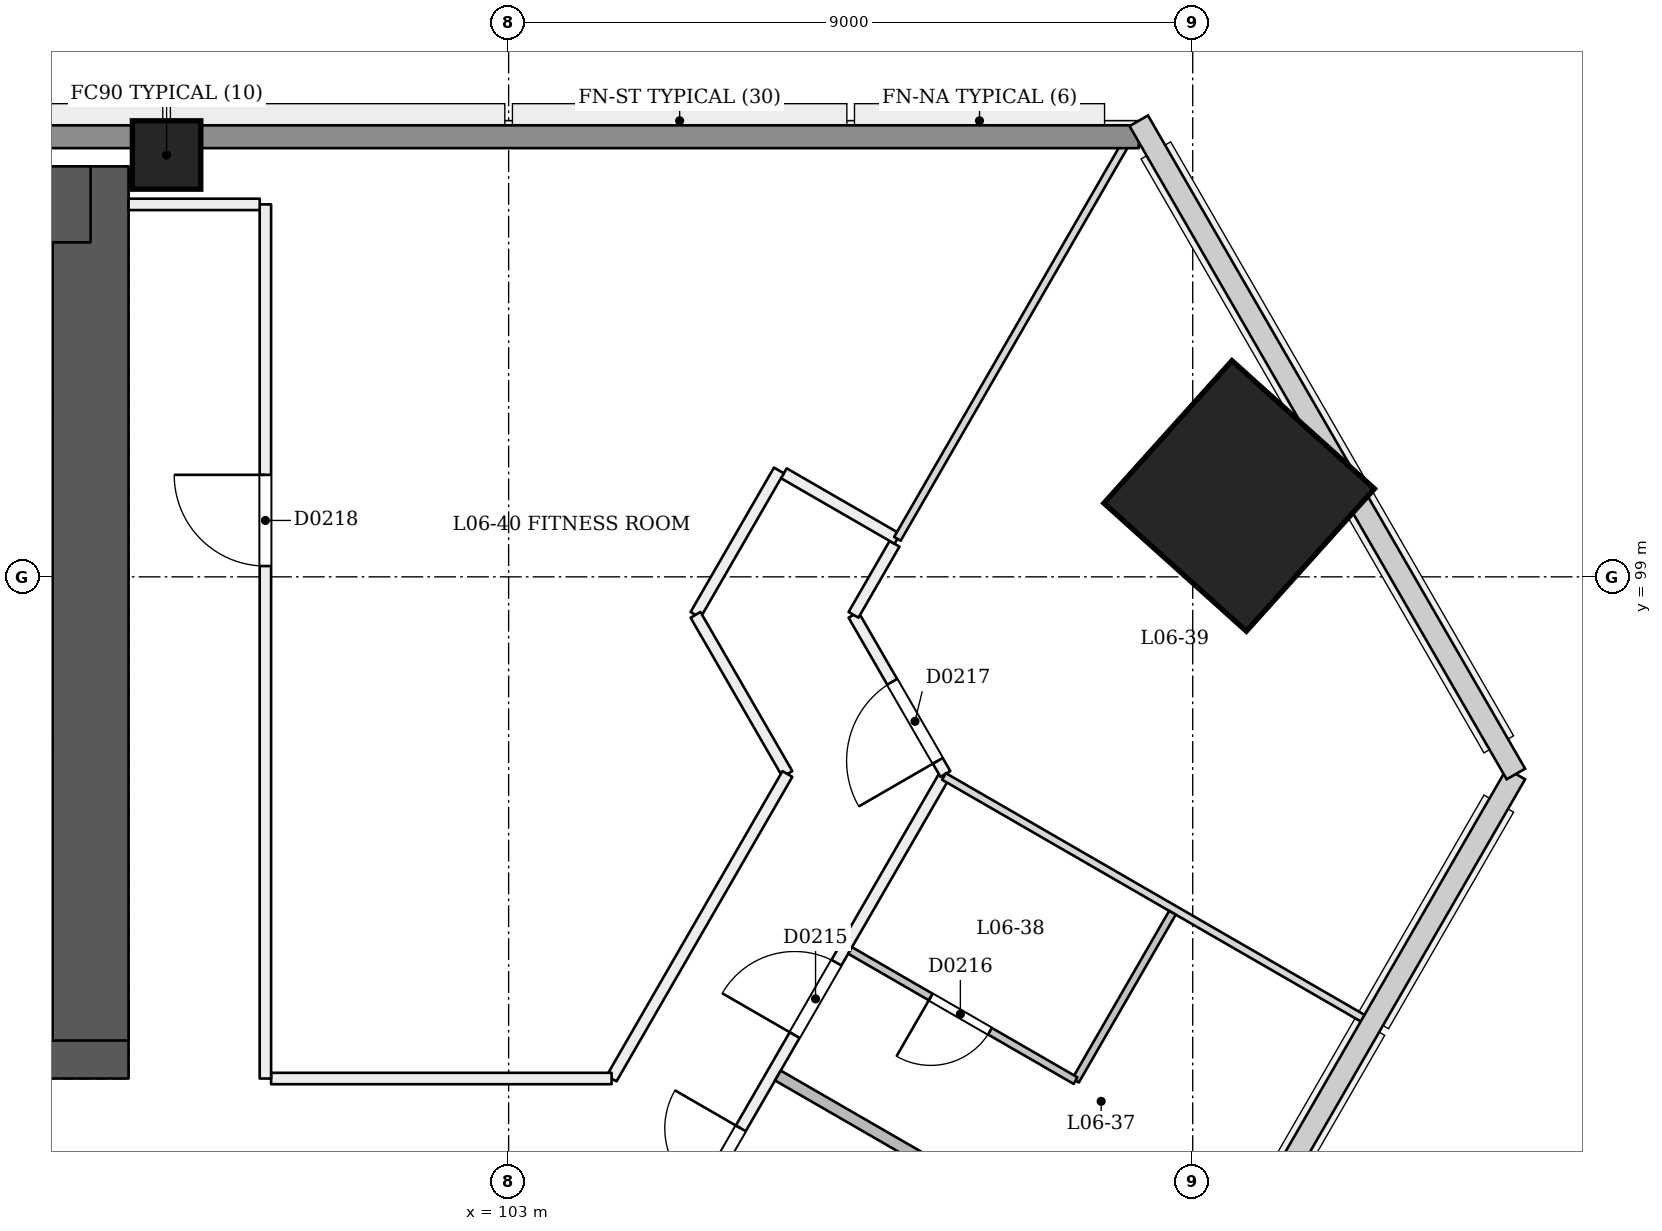
"""IFC4 building model, lengths in metres.
Left out: names, types, materials, properties, quantities, classifications, styles, units other than length and angle.
Written with IfcOpenShell. Run it as: python <this file> out.ifc"""

import sys

from ifc_helpers import new_model, si_unit, direction, frame, frame_2d, origin, origin_2d, place, context, subcontext, project, spatial, rectangle, extrude, element, fill, save


model = new_model("IFC4")
c1 = context("Model", 3, precision=1e-05, world=origin(), true_north=direction((0.0, 1.0)))
c2 = subcontext(c1, "Body", "Model", "MODEL_VIEW")
j1 = project(units=[si_unit("LENGTHUNIT", "METRE"), si_unit("PLANEANGLEUNIT", "RADIAN")], contexts=[c1])
p1 = place(None, origin())
s1 = spatial("IfcSite", under=j1, at=p1, CompositionType="ELEMENT")
p2 = place(p1, origin())
s2 = spatial("IfcBuilding", under=s1, at=p2, CompositionType="ELEMENT")
p3 = place(p2, frame((0.0, 0.0, 30.6)))
s3 = spatial("IfcBuildingStorey", under=s2, at=p3, CompositionType="ELEMENT", Elevation=30.6)
p4 = place(p3, frame((72.5, 92.9, 0.0), z_axis=(0.0, 0.0, 1.0), x_axis=(1.0, 0.0, 0.0)))
e1 = element("IfcWall", 1, at=p4, inside=s3, PredefinedType="SHEAR", context=c2, shape_type="SweptSolid", body=[
    extrude(rectangle(XDim=25.5, YDim=1.0, at=frame_2d((12.75, 0.0))), origin(), (0.0, 0.0, 1.0), 3.6),
])
p5 = place(p4, frame((1.3, 0.0, 0.0)))
e2 = element("IfcOpeningElement", 2, at=p5, cuts=e1, PredefinedType="OPENING", context=c2, shape_type="SweptSolid", body=[
    extrude(rectangle(XDim=1.2, YDim=2.1, at=frame_2d((0.6, 1.05))), frame((0.0, 0.51, 0.0), z_axis=(0.0, -1.0, 0.0), x_axis=(1.0, 0.0, 0.0)), (0.0, 0.0, 1.0), 1.021),
])
p6 = place(p4, frame((3.5, 0.0, 0.0)))
e3 = element("IfcOpeningElement", 3, at=p6, cuts=e1, PredefinedType="OPENING", context=c2, shape_type="SweptSolid", body=[
    extrude(rectangle(XDim=1.2, YDim=2.1, at=frame_2d((0.6, 1.05))), frame((0.0, 0.51, 0.0), z_axis=(0.0, -1.0, 0.0), x_axis=(1.0, 0.0, 0.0)), (0.0, 0.0, 1.0), 1.021),
])
p7 = place(p4, frame((13.5, 0.0, 0.0)))
e4 = element("IfcOpeningElement", 4, at=p7, cuts=e1, PredefinedType="OPENING", context=c2, shape_type="SweptSolid", body=[
    extrude(rectangle(XDim=1.2, YDim=2.1, at=frame_2d((0.6, 1.05))), frame((0.0, 0.51, 0.0), z_axis=(0.0, -1.0, 0.0), x_axis=(1.0, 0.0, 0.0)), (0.0, 0.0, 1.0), 1.021),
])
p8 = place(p4, frame((15.812, 0.0, 0.0)))
e5 = element("IfcOpeningElement", 5, at=p8, cuts=e1, PredefinedType="OPENING", context=c2, shape_type="SweptSolid", body=[
    extrude(rectangle(XDim=1.0, YDim=2.1, at=frame_2d((0.5, 1.05))), frame((0.0, 0.51, 0.0), z_axis=(0.0, -1.0, 0.0), x_axis=(1.0, 0.0, 0.0)), (0.0, 0.0, 1.0), 1.021),
])
p9 = place(p4, frame((19.25, 0.0, 0.0)))
e6 = element("IfcOpeningElement", 6, at=p9, cuts=e1, PredefinedType="OPENING", context=c2, shape_type="SweptSolid", body=[
    extrude(rectangle(XDim=1.0, YDim=2.1, at=frame_2d((0.5, 1.05))), frame((0.0, 0.51, 0.0), z_axis=(0.0, -1.0, 0.0), x_axis=(1.0, 0.0, 0.0)), (0.0, 0.0, 1.0), 1.021),
])
p10 = place(p4, frame((22.788, 0.0, 0.0)))
e7 = element("IfcOpeningElement", 7, at=p10, cuts=e1, PredefinedType="OPENING", context=c2, shape_type="SweptSolid", body=[
    extrude(rectangle(XDim=1.0, YDim=2.1, at=frame_2d((0.5, 1.05))), frame((0.0, 0.51, 0.0), z_axis=(0.0, -1.0, 0.0), x_axis=(1.0, 0.0, 0.0)), (0.0, 0.0, 1.0), 1.021),
])
p11 = place(p3, frame((97.5, 92.9, 0.0), z_axis=(0.0, 0.0, 1.0), x_axis=(0.0, 1.0, 0.0)))
e8 = element("IfcWall", 8, at=p11, inside=s3, PredefinedType="SHEAR", context=c2, shape_type="SweptSolid", body=[
    extrude(rectangle(XDim=11.5, YDim=1.0, at=frame_2d((5.75, 0.0))), origin(), (0.0, 0.0, 1.0), 3.6),
])
p12 = place(p3, frame((97.5, 103.9, 0.0), z_axis=(0.0, 0.0, 1.0), x_axis=(-1.0, 0.0, 0.0)))
e9 = element("IfcWall", 9, at=p12, inside=s3, PredefinedType="SHEAR", context=c2, shape_type="SweptSolid", body=[
    extrude(rectangle(XDim=25.5, YDim=1.0, at=frame_2d((12.75, 0.0))), origin(), (0.0, 0.0, 1.0), 3.6),
])
p13 = place(p3, frame((112.645, 100.053, 0.0), z_axis=(-0.028403739082, 0.009219352065, 0.999554016126), x_axis=(0.500759903992, -0.865301216656, 0.022210875906)))
e10 = element("IfcColumn", 10, at=p13, inside=s3, PredefinedType="COLUMN", context=c2, shape_type="SweptSolid", body=[
    extrude(rectangle(XDim=2.52, YDim=2.52, at=origin_2d()), origin(), (0.0, 0.0, 1.0), 3.602),
])
p14 = place(p3, frame((98.5, 104.55, 0.0), z_axis=(0.0, 0.0, 1.0), x_axis=(1.0, 0.0, 0.0)))
e11 = element("IfcColumn", 11, at=p14, inside=s3, PredefinedType="COLUMN", context=c2, shape_type="SweptSolid", body=[
    extrude(rectangle(XDim=0.9, YDim=0.9, at=origin_2d()), origin(), (0.0, 0.0, 1.0), 3.6),
])
p15 = place(p3, frame((86.227, 57.403, 0.0), z_axis=(0.0, 0.0, 1.0), x_axis=(0.5000018851, 0.866024315419, 0.0)))
e12 = element("IfcWall", 12, at=p15, inside=s3, PredefinedType="PARTITIONING", context=c2, shape_type="SweptSolid", body=[
    extrude(rectangle(XDim=45.0, YDim=0.15, at=frame_2d((22.5, 0.0))), origin(), (0.0, 0.0, 1.0), 2.7),
])
p16 = place(p15, frame((0.72, 0.0, 0.0)))
e13 = element("IfcOpeningElement", 13, at=p16, cuts=e12, PredefinedType="OPENING", context=c2, shape_type="SweptSolid", body=[
    extrude(rectangle(XDim=1.0, YDim=2.1, at=frame_2d((0.5, 1.05))), frame((0.0, 0.085, 0.0), z_axis=(0.0, -1.0, 0.0), x_axis=(1.0, 0.0, 0.0)), (0.0, 0.0, 1.0), 0.171),
])
p17 = place(p15, frame((5.22, 0.0, 0.0)))
e14 = element("IfcOpeningElement", 14, at=p17, cuts=e12, PredefinedType="OPENING", context=c2, shape_type="SweptSolid", body=[
    extrude(rectangle(XDim=1.0, YDim=2.1, at=frame_2d((0.5, 1.05))), frame((0.0, 0.085, 0.0), z_axis=(0.0, -1.0, 0.0), x_axis=(1.0, 0.0, 0.0)), (0.0, 0.0, 1.0), 0.171),
])
p18 = place(p15, frame((11.78, 0.0, 0.0)))
e15 = element("IfcOpeningElement", 15, at=p18, cuts=e12, PredefinedType="OPENING", context=c2, shape_type="SweptSolid", body=[
    extrude(rectangle(XDim=1.0, YDim=2.1, at=frame_2d((0.5, 1.05))), frame((0.0, 0.085, 0.0), z_axis=(0.0, -1.0, 0.0), x_axis=(1.0, 0.0, 0.0)), (0.0, 0.0, 1.0), 0.171),
])
p19 = place(p15, frame((14.22, 0.0, 0.0)))
e16 = element("IfcOpeningElement", 16, at=p19, cuts=e12, PredefinedType="OPENING", context=c2, shape_type="SweptSolid", body=[
    extrude(rectangle(XDim=1.0, YDim=2.1, at=frame_2d((0.5, 1.05))), frame((0.0, 0.085, 0.0), z_axis=(0.0, -1.0, 0.0), x_axis=(1.0, 0.0, 0.0)), (0.0, 0.0, 1.0), 0.171),
])
p20 = place(p15, frame((19.75, 0.0, 0.0)))
e17 = element("IfcOpeningElement", 17, at=p20, cuts=e12, PredefinedType="OPENING", context=c2, shape_type="SweptSolid", body=[
    extrude(rectangle(XDim=1.0, YDim=2.1, at=frame_2d((0.5, 1.05))), frame((0.0, 0.085, 0.0), z_axis=(0.0, -1.0, 0.0), x_axis=(1.0, 0.0, 0.0)), (0.0, 0.0, 1.0), 0.171),
])
p21 = place(p15, frame((23.105, 0.0, 0.0)))
e18 = element("IfcOpeningElement", 18, at=p21, cuts=e12, PredefinedType="OPENING", context=c2, shape_type="SweptSolid", body=[
    extrude(rectangle(XDim=1.0, YDim=2.1, at=frame_2d((0.5, 1.05))), frame((0.0, 0.085, 0.0), z_axis=(0.0, -1.0, 0.0), x_axis=(1.0, 0.0, 0.0)), (0.0, 0.0, 1.0), 0.171),
])
p22 = place(p15, frame((28.75, 0.0, 0.0)))
e19 = element("IfcOpeningElement", 19, at=p22, cuts=e12, PredefinedType="OPENING", context=c2, shape_type="SweptSolid", body=[
    extrude(rectangle(XDim=1.0, YDim=2.1, at=frame_2d((0.5, 1.05))), frame((0.0, 0.085, 0.0), z_axis=(0.0, -1.0, 0.0), x_axis=(1.0, 0.0, 0.0)), (0.0, 0.0, 1.0), 0.171),
])
p23 = place(p15, frame((32.105, 0.0, 0.0)))
e20 = element("IfcOpeningElement", 20, at=p23, cuts=e12, PredefinedType="OPENING", context=c2, shape_type="SweptSolid", body=[
    extrude(rectangle(XDim=1.0, YDim=2.1, at=frame_2d((0.5, 1.05))), frame((0.0, 0.085, 0.0), z_axis=(0.0, -1.0, 0.0), x_axis=(1.0, 0.0, 0.0)), (0.0, 0.0, 1.0), 0.171),
])
p24 = place(p15, frame((36.504, 0.0, 0.0)))
e21 = element("IfcOpeningElement", 21, at=p24, cuts=e12, PredefinedType="OPENING", context=c2, shape_type="SweptSolid", body=[
    extrude(rectangle(XDim=1.0, YDim=2.1, at=frame_2d((0.5, 1.05))), frame((0.0, 0.085, 0.0), z_axis=(0.0, -1.0, 0.0), x_axis=(1.0, 0.0, 0.0)), (0.0, 0.0, 1.0), 0.171),
])
p25 = place(p15, frame((38.654, 0.0, 0.0)))
e22 = element("IfcOpeningElement", 22, at=p25, cuts=e12, PredefinedType="OPENING", context=c2, shape_type="SweptSolid", body=[
    extrude(rectangle(XDim=1.0, YDim=2.1, at=frame_2d((0.5, 1.05))), frame((0.0, 0.085, 0.0), z_axis=(0.0, -1.0, 0.0), x_axis=(1.0, 0.0, 0.0)), (0.0, 0.0, 1.0), 0.171),
])
p26 = place(p15, frame((41.071, 0.0, 0.0)))
e23 = element("IfcOpeningElement", 23, at=p26, cuts=e12, PredefinedType="OPENING", context=c2, shape_type="SweptSolid", body=[
    extrude(rectangle(XDim=1.1, YDim=2.1, at=frame_2d((0.55, 1.05))), frame((0.0, 0.085, 0.0), z_axis=(0.0, -1.0, 0.0), x_axis=(1.0, 0.0, 0.0)), (0.0, 0.0, 1.0), 0.171),
])
p27 = place(p3, frame((108.746, 96.406, 0.0), z_axis=(0.0, 0.0, 1.0), x_axis=(-0.500016772967, 0.866015719691, 0.0)))
e24 = element("IfcWall", 24, at=p27, inside=s3, PredefinedType="PARTITIONING", context=c2, shape_type="SweptSolid", body=[
    extrude(rectangle(XDim=2.417, YDim=0.15, at=frame_2d((1.209, 0.0))), origin(), (0.0, 0.0, 1.0), 3.1),
])
p28 = place(p27, frame((0.2, 0.0, 0.0)))
e25 = element("IfcOpeningElement", 25, at=p28, cuts=e24, PredefinedType="OPENING", context=c2, shape_type="SweptSolid", body=[
    extrude(rectangle(XDim=1.2, YDim=2.1, at=frame_2d((0.6, 1.05))), frame((0.0, 0.085, 0.0), z_axis=(0.0, -1.0, 0.0), x_axis=(1.0, 0.0, 0.0)), (0.0, 0.0, 1.0), 0.171),
])
p29 = place(p3, frame((107.537, 98.5, 0.0), z_axis=(0.0, 0.0, 1.0), x_axis=(0.499957341738, 0.866050031143, 0.0)))
e26 = element("IfcWall", 26, at=p29, inside=s3, PredefinedType="PARTITIONING", context=c2, shape_type="SweptSolid", body=[
    extrude(rectangle(XDim=1.08, YDim=0.15, at=frame_2d((0.54, 0.0))), origin(), (0.0, 0.0, 1.0), 3.1),
])
p30 = place(p3, frame((108.115, 99.5, 0.0), z_axis=(0.0, 0.0, 1.0), x_axis=(-0.866013532718, 0.500020560727, 0.0)))
e27 = element("IfcWall", 27, at=p30, inside=s3, PredefinedType="PARTITIONING", context=c2, shape_type="SweptSolid", body=[
    extrude(rectangle(XDim=1.725, YDim=0.15, at=frame_2d((0.863, 0.0))), origin(), (0.0, 0.0, 1.0), 3.1),
])
p31 = place(p3, frame((106.556, 100.4, 0.0), z_axis=(0.0, 0.0, 1.0), x_axis=(-0.500005024956, -0.866022502605, 0.0)))
e28 = element("IfcWall", 28, at=p31, inside=s3, PredefinedType="PARTITIONING", context=c2, shape_type="SweptSolid", body=[
    extrude(rectangle(XDim=2.194, YDim=0.15, at=frame_2d((1.097, 0.0))), origin(), (0.0, 0.0, 1.0), 3.1),
])
p32 = place(p3, frame((105.459, 98.5, 0.0), z_axis=(0.0, 0.0, 1.0), x_axis=(0.500016772967, -0.866015719691, 0.0)))
e29 = element("IfcWall", 29, at=p32, inside=s3, PredefinedType="PARTITIONING", context=c2, shape_type="SweptSolid", body=[
    extrude(rectangle(XDim=2.417, YDim=0.15, at=frame_2d((1.209, 0.0))), origin(), (0.0, 0.0, 1.0), 3.1),
])
p33 = place(p3, frame((106.667, 96.406, 0.0), z_axis=(0.0, 0.0, 1.0), x_axis=(-0.499964565595, -0.866045860881, 0.0)))
e30 = element("IfcWall", 30, at=p33, inside=s3, PredefinedType="PARTITIONING", context=c2, shape_type="SweptSolid", body=[
    extrude(rectangle(XDim=4.626, YDim=0.15, at=frame_2d((2.313, 0.0))), origin(), (0.0, 0.0, 1.0), 3.1),
])
p34 = place(p3, frame((104.354, 92.4, 0.0), z_axis=(0.0, 0.0, 1.0), x_axis=(-1.0, 0.0, 0.0)))
e31 = element("IfcWall", 31, at=p34, inside=s3, PredefinedType="PARTITIONING", context=c2, shape_type="SweptSolid", body=[
    extrude(rectangle(XDim=4.479, YDim=0.15, at=frame_2d((2.24, 0.0))), origin(), (0.0, 0.0, 1.0), 3.1),
])
p35 = place(p3, frame((99.8, 92.4, 0.0), z_axis=(0.0, 0.0, 1.0), x_axis=(0.0, 1.0, 0.0)))
e32 = element("IfcWall", 32, at=p35, inside=s3, PredefinedType="PARTITIONING", context=c2, shape_type="SweptSolid", body=[
    extrude(rectangle(XDim=11.5, YDim=0.15, at=frame_2d((5.75, 0.0))), origin(), (0.0, 0.0, 1.0), 2.6),
])
p36 = place(p35, frame((6.742, 0.0, 0.0)))
e33 = element("IfcOpeningElement", 33, at=p36, cuts=e32, PredefinedType="OPENING", context=c2, shape_type="SweptSolid", body=[
    extrude(rectangle(XDim=1.2, YDim=2.1, at=frame_2d((0.6, 1.05))), frame((0.0, 0.085, 0.0), z_axis=(0.0, -1.0, 0.0), x_axis=(1.0, 0.0, 0.0)), (0.0, 0.0, 1.0), 0.171),
])
p37 = place(p3, frame((99.725, 103.9, 0.0), z_axis=(0.0, 0.0, 1.0), x_axis=(-1.0, 0.0, 0.0)))
e34 = element("IfcWall", 34, at=p37, inside=s3, PredefinedType="PARTITIONING", context=c2, shape_type="SweptSolid", body=[
    extrude(rectangle(XDim=1.725, YDim=0.15, at=frame_2d((0.863, 0.0))), origin(), (0.0, 0.0, 1.0), 2.6),
])
p38 = place(p3, frame((112.037, 89.267, 0.0), z_axis=(0.0, 0.0, 1.0), x_axis=(-0.866025401434, 0.500000004071, 0.0)))
e35 = element("IfcWall", 35, at=p38, inside=s3, PredefinedType="PARTITIONING", context=c2, shape_type="SweptSolid", body=[
    extrude(rectangle(XDim=6.345, YDim=0.15, at=frame_2d((3.173, 0.0))), origin(), (0.0, 0.0, 1.0), 2.6),
])
p39 = place(p3, frame((111.733, 94.581, 0.0), z_axis=(0.0, 0.0, 1.0), x_axis=(-0.499990435942, -0.866030925526, 0.0)))
e36 = element("IfcWall", 36, at=p39, inside=s3, PredefinedType="PARTITIONING", context=c2, shape_type="SweptSolid", body=[
    extrude(rectangle(XDim=2.55, YDim=0.1, at=frame_2d((1.275, 0.0))), origin(), (0.0, 0.0, 1.0), 2.6),
])
p40 = place(p3, frame((110.458, 92.373, 0.0), z_axis=(0.0, 0.0, 1.0), x_axis=(-0.866032454348, 0.499987787867, 0.0)))
e37 = element("IfcWall", 37, at=p40, inside=s3, PredefinedType="PARTITIONING", context=c2, shape_type="SweptSolid", body=[
    extrude(rectangle(XDim=3.425, YDim=0.1, at=frame_2d((1.712, 0.0))), origin(), (0.0, 0.0, 1.0), 3.1),
])
p41 = place(p40, frame((1.3, 0.0, 0.0)))
e38 = element("IfcOpeningElement", 38, at=p41, cuts=e37, PredefinedType="OPENING", context=c2, shape_type="SweptSolid", body=[
    extrude(rectangle(XDim=0.9, YDim=2.1, at=frame_2d((0.45, 1.05))), frame((0.0, 0.061, 0.0), z_axis=(0.0, -1.0, 0.0), x_axis=(1.0, 0.0, 0.0)), (0.0, 0.0, 1.0), 0.121),
])
p42 = place(p3, frame((114.287, 93.164, 0.0), z_axis=(0.0, 0.0, 1.0), x_axis=(-0.866034872269, 0.499983599745, 0.0)))
e39 = element("IfcWall", 39, at=p42, inside=s3, PredefinedType="PARTITIONING", context=c2, shape_type="SweptSolid", body=[
    extrude(rectangle(XDim=6.42, YDim=0.1, at=frame_2d((3.21, 0.0))), origin(), (0.0, 0.0, 1.0), 2.6),
])
p43 = place(p3, frame((111.232, 104.9, 0.0), z_axis=(0.0, 0.0, 1.0), x_axis=(-0.500004896655, -0.866022576681, 0.0)))
e40 = element("IfcWall", 40, at=p43, inside=s3, PredefinedType="PARTITIONING", context=c2, shape_type="SweptSolid", body=[
    extrude(rectangle(XDim=6.235, YDim=0.1, at=frame_2d((3.118, 0.0))), origin(), (0.0, 0.0, 1.0), 2.6),
])
p44 = place(p3, frame((58.71, 104.79, 0.0), z_axis=(0.0, 0.0, 1.0), x_axis=(1.0, 0.0, 0.0)))
e41 = element("IfcWall", 41, at=p44, inside=s3, PredefinedType="SOLIDWALL", context=c2, shape_type="SweptSolid", body=[
    extrude(rectangle(XDim=52.58, YDim=0.3, at=frame_2d((26.29, 0.0))), origin(), (0.0, 0.0, 1.0), 2.6),
])
p45 = place(p25, origin())
e42 = element("IfcDoor", 42, at=p45, inside=s3, OperationType="SINGLE_SWING_RIGHT", PredefinedType="NOTDEFINED", context=c2, shape_type="SweptSolid", body=[
    extrude(rectangle(XDim=1.0, YDim=2.1, at=frame_2d((0.5, 1.05))), frame((0.0, 0.025, 0.0), z_axis=(0.0, -1.0, 0.0), x_axis=(1.0, 0.0, 0.0)), (0.0, 0.0, 1.0), 0.05),
])
fill(e22, e42)
p46 = place(p26, origin())
e43 = element("IfcDoor", 43, at=p46, inside=s3, OperationType="SINGLE_SWING_LEFT", PredefinedType="NOTDEFINED", context=c2, shape_type="SweptSolid", body=[
    extrude(rectangle(XDim=1.1, YDim=2.1, at=frame_2d((0.55, 1.05))), frame((0.0, 0.025, 0.0), z_axis=(0.0, -1.0, 0.0), x_axis=(1.0, 0.0, 0.0)), (0.0, 0.0, 1.0), 0.05),
])
fill(e23, e43)
p47 = place(p41, origin())
e44 = element("IfcDoor", 44, at=p47, inside=s3, OperationType="SINGLE_SWING_RIGHT", PredefinedType="NOTDEFINED", context=c2, shape_type="SweptSolid", body=[
    extrude(rectangle(XDim=0.9, YDim=2.1, at=frame_2d((0.45, 1.05))), frame((0.0, 0.025, 0.0), z_axis=(0.0, -1.0, 0.0), x_axis=(1.0, 0.0, 0.0)), (0.0, 0.0, 1.0), 0.05),
])
fill(e38, e44)
p48 = place(p28, origin())
e45 = element("IfcDoor", 45, at=p48, inside=s3, OperationType="SINGLE_SWING_LEFT", PredefinedType="NOTDEFINED", context=c2, shape_type="SweptSolid", body=[
    extrude(rectangle(XDim=1.2, YDim=2.1, at=frame_2d((0.6, 1.05))), frame((0.0, 0.025, 0.0), z_axis=(0.0, -1.0, 0.0), x_axis=(1.0, 0.0, 0.0)), (0.0, 0.0, 1.0), 0.05),
])
fill(e25, e45)
p49 = place(p36, origin())
e46 = element("IfcDoor", 46, at=p49, inside=s3, OperationType="SINGLE_SWING_RIGHT", PredefinedType="NOTDEFINED", context=c2, shape_type="SweptSolid", body=[
    extrude(rectangle(XDim=1.2, YDim=2.1, at=frame_2d((0.6, 1.05))), frame((0.0, 0.025, 0.0), z_axis=(0.0, -1.0, 0.0), x_axis=(1.0, 0.0, 0.0)), (0.0, 0.0, 1.0), 0.05),
])
fill(e33, e46)
save(model, sys.argv[1])
